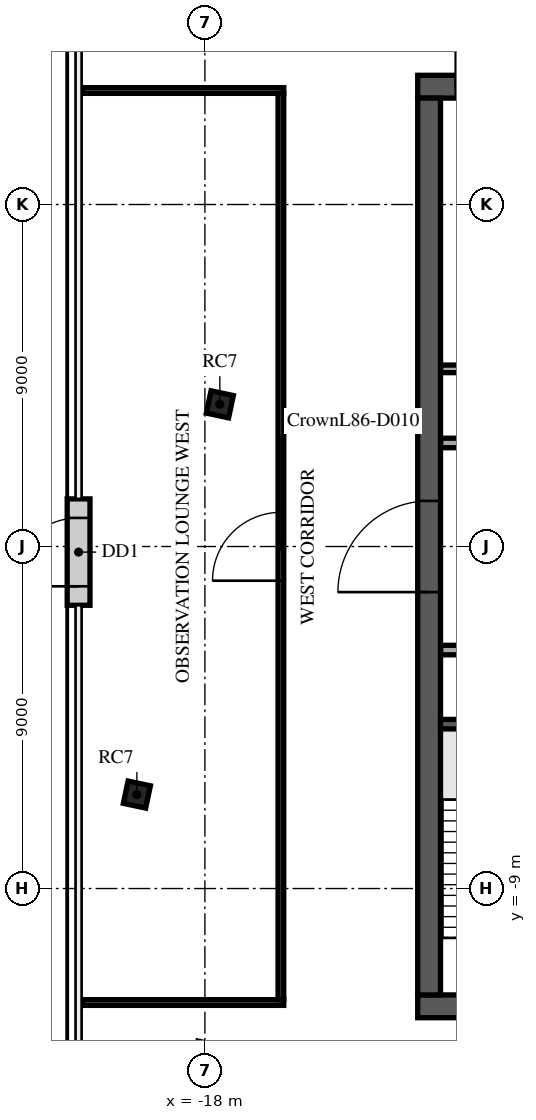
"""IFC4 building model, lengths in metres.
Left out: names, types, materials, properties, quantities, classifications, styles, units other than length and angle.
Written with IfcOpenShell. Run it as: python <this file> out.ifc"""

import sys

from ifc_helpers import new_model, si_unit, direction, frame, frame_2d, origin, origin_2d, place, context, subcontext, project, spatial, rectangle, extrude, element, fill, save


model = new_model("IFC4")
c1 = context("Model", 3, precision=1e-05, world=origin(), true_north=direction((0.0, 1.0)))
c2 = subcontext(c1, "Body", "Model", "MODEL_VIEW")
j1 = project(units=[si_unit("LENGTHUNIT", "METRE"), si_unit("PLANEANGLEUNIT", "RADIAN")], contexts=[c1])
p1 = place(None, origin())
s1 = spatial("IfcSite", under=j1, at=p1, CompositionType="ELEMENT")
p2 = place(p1, origin())
s2 = spatial("IfcBuilding", under=s1, at=p2, CompositionType="ELEMENT")
p3 = place(p2, frame((0.0, 0.0, 368.1)))
s3 = spatial("IfcBuildingStorey", under=s2, at=p3, CompositionType="ELEMENT", Elevation=368.1)
for number, where, z_axis, x_axis in (
    (1, (-17.607, 3.742, 0.0), (0.0, 0.0, 1.0), (0.208, 0.978, 0.0)),
    (2, (-19.79, -6.528, 0.0), (0.0, 0.0, 1.0), (0.208, 0.978, 0.0)),
):
    element("IfcColumn", number, at=place(p3, frame(where, z_axis=z_axis, x_axis=x_axis)), inside=s3, PredefinedType="COLUMN", context=c2, shape_type="SweptSolid", body=[
        extrude(rectangle(XDim=0.6, YDim=0.6, at=origin_2d()), origin(), (0.0, 0.0, 1.0), 5.0),
    ])
p4 = place(p3, frame((-12.4, 12.1, 0.0), z_axis=(0.0, 0.0, 1.0), x_axis=(1.0, 0.0, 0.0)))
e3 = element("IfcWall", 3, at=p4, inside=s3, PredefinedType="SHEAR", context=c2, shape_type="SweptSolid", body=[
    extrude(rectangle(XDim=24.8, YDim=0.6, at=frame_2d((12.4, 0.0))), origin(), (0.0, 0.0, 1.0), 4.7),
])
p5 = place(p4, frame((11.2, 0.0, 0.0)))
e4 = element("IfcOpeningElement", 4, at=p5, cuts=e3, PredefinedType="OPENING", context=c2, shape_type="SweptSolid", body=[
    extrude(rectangle(XDim=2.4, YDim=2.4, at=frame_2d((1.2, 1.2))), frame((0.0, 0.31, 0.0), z_axis=(0.0, -1.0, 0.0), x_axis=(1.0, 0.0, 0.0)), (0.0, 0.0, 1.0), 0.62),
])
p6 = place(p4, frame((22.025, 0.0, 0.0)))
e5 = element("IfcOpeningElement", 5, at=p6, cuts=e3, PredefinedType="OPENING", context=c2, shape_type="SweptSolid", body=[
    extrude(rectangle(XDim=1.2, YDim=2.1, at=frame_2d((0.6, 1.05))), frame((0.0, 0.31, 0.0), z_axis=(0.0, -1.0, 0.0), x_axis=(1.0, 0.0, 0.0)), (0.0, 0.0, 1.0), 0.62),
])
p7 = place(p4, frame((1.0, 0.0, 0.0)))
e6 = element("IfcOpeningElement", 6, at=p7, cuts=e3, PredefinedType="OPENING", context=c2, shape_type="SweptSolid", body=[
    extrude(rectangle(XDim=1.0, YDim=2.1, at=frame_2d((0.5, 1.05))), frame((0.0, 0.31, 0.0), z_axis=(0.0, -1.0, 0.0), x_axis=(1.0, 0.0, 0.0)), (0.0, 0.0, 1.0), 0.62),
])
p8 = place(p3, frame((-12.4, -12.1, 0.0), z_axis=(0.0, 0.0, 1.0), x_axis=(1.0, 0.0, 0.0)))
e7 = element("IfcWall", 7, at=p8, inside=s3, PredefinedType="SHEAR", context=c2, shape_type="SweptSolid", body=[
    extrude(rectangle(XDim=24.8, YDim=0.6, at=frame_2d((12.4, 0.0))), origin(), (0.0, 0.0, 1.0), 4.7),
])
p9 = place(p8, frame((7.3, 0.0, 0.0)))
e8 = element("IfcOpeningElement", 8, at=p9, cuts=e7, PredefinedType="OPENING", context=c2, shape_type="SweptSolid", body=[
    extrude(rectangle(XDim=2.0, YDim=2.1, at=frame_2d((1.0, 1.05))), frame((0.0, 0.31, 0.0), z_axis=(0.0, -1.0, 0.0), x_axis=(1.0, 0.0, 0.0)), (0.0, 0.0, 1.0), 0.62),
])
p10 = place(p8, frame((17.425, 0.0, 0.0)))
e9 = element("IfcOpeningElement", 9, at=p10, cuts=e7, PredefinedType="OPENING", context=c2, shape_type="SweptSolid", body=[
    extrude(rectangle(XDim=1.2, YDim=2.1, at=frame_2d((0.6, 1.05))), frame((0.0, 0.31, 0.0), z_axis=(0.0, -1.0, 0.0), x_axis=(1.0, 0.0, 0.0)), (0.0, 0.0, 1.0), 0.62),
])
p11 = place(p8, frame((1.575, 0.0, 0.0)))
e10 = element("IfcOpeningElement", 10, at=p11, cuts=e7, PredefinedType="OPENING", context=c2, shape_type="SweptSolid", body=[
    extrude(rectangle(XDim=1.2, YDim=2.1, at=frame_2d((0.6, 1.05))), frame((0.0, 0.31, 0.0), z_axis=(0.0, -1.0, 0.0), x_axis=(1.0, 0.0, 0.0)), (0.0, 0.0, 1.0), 0.62),
])
p12 = place(p8, frame((22.025, 0.0, 0.0)))
e11 = element("IfcOpeningElement", 11, at=p12, cuts=e7, PredefinedType="OPENING", context=c2, shape_type="SweptSolid", body=[
    extrude(rectangle(XDim=1.2, YDim=2.1, at=frame_2d((0.6, 1.05))), frame((0.0, 0.31, 0.0), z_axis=(0.0, -1.0, 0.0), x_axis=(1.0, 0.0, 0.0)), (0.0, 0.0, 1.0), 0.62),
])
p13 = place(p3, frame((-12.1, -11.8, 0.0), z_axis=(0.0, 0.0, 1.0), x_axis=(0.0, 1.0, 0.0)))
e12 = element("IfcWall", 12, at=p13, inside=s3, PredefinedType="SHEAR", context=c2, shape_type="SweptSolid", body=[
    extrude(rectangle(XDim=23.6, YDim=0.6, at=frame_2d((11.8, 0.0))), origin(), (0.0, 0.0, 1.0), 4.7),
])
p14 = place(p13, frame((10.6, 0.0, 0.0)))
e13 = element("IfcOpeningElement", 13, at=p14, cuts=e12, PredefinedType="OPENING", context=c2, shape_type="SweptSolid", body=[
    extrude(rectangle(XDim=2.4, YDim=2.4, at=frame_2d((1.2, 1.2))), frame((0.0, 0.31, 0.0), z_axis=(0.0, -1.0, 0.0), x_axis=(1.0, 0.0, 0.0)), (0.0, 0.0, 1.0), 0.62),
])
p15 = place(p3, frame((-8.65, -4.675, 0.0), z_axis=(0.0, 0.0, 1.0), x_axis=(-1.0, 0.0, 0.0)))
e14 = element("IfcWall", 14, at=p15, inside=s3, PredefinedType="SOLIDWALL", context=c2, shape_type="SweptSolid", body=[
    extrude(rectangle(XDim=3.15, YDim=0.25, at=frame_2d((1.575, 0.0))), origin(), (0.0, 0.0, 1.0), 4.7),
])
p16 = place(p3, frame((-11.795, -2.725, 0.0), z_axis=(0.0, 0.0, 1.0), x_axis=(1.0, 0.0, 0.0)))
e15 = element("IfcWall", 15, at=p16, inside=s3, PredefinedType="PARTITIONING", context=c2, shape_type="SweptSolid", body=[
    extrude(rectangle(XDim=14.415, YDim=0.25, at=frame_2d((7.208, 0.0))), origin(), (0.0, 0.0, 1.0), 4.7),
])
p17 = place(p16, frame((1.295, 0.0, 0.0)))
e16 = element("IfcOpeningElement", 16, at=p17, cuts=e15, PredefinedType="OPENING", context=c2, shape_type="SweptSolid", body=[
    extrude(rectangle(XDim=1.0, YDim=2.1, at=frame_2d((0.5, 1.05))), frame((0.0, 0.135, 0.0), z_axis=(0.0, -1.0, 0.0), x_axis=(1.0, 0.0, 0.0)), (0.0, 0.0, 1.0), 0.27),
])
p18 = place(p16, frame((4.42, 0.0, 0.0)))
e17 = element("IfcOpeningElement", 17, at=p18, cuts=e15, PredefinedType="OPENING", context=c2, shape_type="SweptSolid", body=[
    extrude(rectangle(XDim=1.0, YDim=2.1, at=frame_2d((0.5, 1.05))), frame((0.0, 0.135, 0.0), z_axis=(0.0, -1.0, 0.0), x_axis=(1.0, 0.0, 0.0)), (0.0, 0.0, 1.0), 0.27),
])
p19 = place(p16, frame((9.92, 0.0, 0.0)))
e18 = element("IfcOpeningElement", 18, at=p19, cuts=e15, PredefinedType="OPENING", context=c2, shape_type="SweptSolid", body=[
    extrude(rectangle(XDim=1.0, YDim=2.1, at=frame_2d((0.5, 1.05))), frame((0.0, 0.135, 0.0), z_axis=(0.0, -1.0, 0.0), x_axis=(1.0, 0.0, 0.0)), (0.0, 0.0, 1.0), 0.27),
])
p20 = place(p3, frame((-11.795, 2.725, 0.0), z_axis=(0.0, 0.0, 1.0), x_axis=(1.0, 0.0, 0.0)))
e19 = element("IfcWall", 19, at=p20, inside=s3, PredefinedType="PARTITIONING", context=c2, shape_type="SweptSolid", body=[
    extrude(rectangle(XDim=23.59, YDim=0.25, at=frame_2d((11.795, 0.0))), origin(), (0.0, 0.0, 1.0), 4.7),
])
p21 = place(p20, frame((21.345, 0.0, 0.0)))
e20 = element("IfcOpeningElement", 20, at=p21, cuts=e19, PredefinedType="OPENING", context=c2, shape_type="SweptSolid", body=[
    extrude(rectangle(XDim=0.9, YDim=2.1, at=frame_2d((0.45, 1.05))), frame((0.0, 0.135, 0.0), z_axis=(0.0, -1.0, 0.0), x_axis=(1.0, 0.0, 0.0)), (0.0, 0.0, 1.0), 0.27),
])
p22 = place(p20, frame((1.345, 0.0, 0.0)))
e21 = element("IfcOpeningElement", 21, at=p22, cuts=e19, PredefinedType="OPENING", context=c2, shape_type="SweptSolid", body=[
    extrude(rectangle(XDim=0.9, YDim=2.1, at=frame_2d((0.45, 1.05))), frame((0.0, 0.135, 0.0), z_axis=(0.0, -1.0, 0.0), x_axis=(1.0, 0.0, 0.0)), (0.0, 0.0, 1.0), 0.27),
])
p23 = place(p20, frame((4.32, 0.0, 0.0)))
e22 = element("IfcOpeningElement", 22, at=p23, cuts=e19, PredefinedType="OPENING", context=c2, shape_type="SweptSolid", body=[
    extrude(rectangle(XDim=1.2, YDim=2.1, at=frame_2d((0.6, 1.05))), frame((0.0, 0.135, 0.0), z_axis=(0.0, -1.0, 0.0), x_axis=(1.0, 0.0, 0.0)), (0.0, 0.0, 1.0), 0.27),
])
p24 = place(p20, frame((15.42, 0.0, 0.0)))
e23 = element("IfcOpeningElement", 23, at=p24, cuts=e19, PredefinedType="OPENING", context=c2, shape_type="SweptSolid", body=[
    extrude(rectangle(XDim=1.0, YDim=2.1, at=frame_2d((0.5, 1.05))), frame((0.0, 0.135, 0.0), z_axis=(0.0, -1.0, 0.0), x_axis=(1.0, 0.0, 0.0)), (0.0, 0.0, 1.0), 0.27),
])
p25 = place(p3, frame((-11.795, 4.675, 0.0), z_axis=(0.0, 0.0, 1.0), x_axis=(1.0, 0.0, 0.0)))
e24 = element("IfcWall", 24, at=p25, inside=s3, PredefinedType="PARTITIONING", context=c2, shape_type="SweptSolid", body=[
    extrude(rectangle(XDim=3.645, YDim=0.2, at=frame_2d((1.823, 0.0))), origin(), (0.0, 0.0, 1.0), 4.7),
])
for number, where, z_axis, x_axis in (
    (25, (-21.223, -12.0, 0.0), (0.0, 0.0, 1.0), (1.0, 0.0, 0.0)),
    (26, (-21.223, 12.0, 0.0), (0.0, 0.0, 1.0), (1.0, 0.0, 0.0)),
):
    element("IfcWall", number, at=place(p3, frame(where, z_axis=z_axis, x_axis=x_axis)), inside=s3, PredefinedType="PARTITIONING", context=c2, shape_type="SweptSolid", body=[
        extrude(rectangle(XDim=5.298, YDim=0.15, at=frame_2d((2.649, 0.0))), origin(), (0.0, 0.0, 1.0), 4.7),
    ])
p26 = place(p3, frame((-16.0, -11.925, 0.0), z_axis=(0.0, 0.0, 1.0), x_axis=(0.0, 1.0, 0.0)))
e27 = element("IfcWall", 27, at=p26, inside=s3, PredefinedType="PARTITIONING", context=c2, shape_type="SweptSolid", body=[
    extrude(rectangle(XDim=23.85, YDim=0.15, at=frame_2d((11.925, 0.0))), origin(), (0.0, 0.0, 1.0), 4.32),
])
p27 = place(p26, frame((11.025, 0.0, 0.0)))
e28 = element("IfcOpeningElement", 28, at=p27, cuts=e27, PredefinedType="OPENING", context=c2, shape_type="SweptSolid", body=[
    extrude(rectangle(XDim=1.8, YDim=2.1, at=frame_2d((0.9, 1.05))), frame((0.0, 0.085, 0.0), z_axis=(0.0, -1.0, 0.0), x_axis=(1.0, 0.0, 0.0)), (0.0, 0.0, 1.0), 0.17),
])
p28 = place(p3, frame((-21.323, -1.547, 0.0), z_axis=(0.0, 0.0, 1.0), x_axis=(0.0, 1.0, 0.0)))
e29 = element("IfcWall", 29, at=p28, inside=s3, PredefinedType="STANDARD", context=c2, shape_type="SweptSolid", body=[
    extrude(rectangle(XDim=2.8, YDim=0.6, at=frame_2d((1.4, 0.0))), origin(), (0.0, 0.0, 1.0), 4.7),
])
p29 = place(p28, frame((0.5, 0.0, 0.0)))
e30 = element("IfcOpeningElement", 30, at=p29, cuts=e29, PredefinedType="OPENING", context=c2, shape_type="SweptSolid", body=[
    extrude(rectangle(XDim=1.8, YDim=2.4, at=frame_2d((0.9, 1.2))), frame((0.0, 0.31, 0.0), z_axis=(0.0, -1.0, 0.0), x_axis=(1.0, 0.0, 0.0)), (0.0, 0.0, 1.0), 0.62),
])
p30 = place(p14, origin())
e31 = element("IfcDoor", 31, at=p30, inside=s3, OperationType="SINGLE_SWING_LEFT", PredefinedType="DOOR", context=c2, shape_type="SweptSolid", body=[
    extrude(rectangle(XDim=2.4, YDim=2.4, at=frame_2d((1.2, 1.2))), frame((0.0, 0.025, 0.0), z_axis=(0.0, -1.0, 0.0), x_axis=(1.0, 0.0, 0.0)), (0.0, 0.0, 1.0), 0.05),
])
fill(e13, e31)
p31 = place(p27, origin())
e32 = element("IfcDoor", 32, at=p31, inside=s3, OperationType="DOUBLE_DOOR_SINGLE_SWING", PredefinedType="DOOR", context=c2, shape_type="SweptSolid", body=[
    extrude(rectangle(XDim=1.8, YDim=2.1, at=frame_2d((0.9, 1.05))), frame((0.0, 0.025, 0.0), z_axis=(0.0, -1.0, 0.0), x_axis=(1.0, 0.0, 0.0)), (0.0, 0.0, 1.0), 0.05),
])
fill(e28, e32)
p32 = place(p29, origin())
e33 = element("IfcDoor", 33, at=p32, inside=s3, OperationType="DOUBLE_DOOR_SINGLE_SWING", PredefinedType="DOOR", context=c2, shape_type="SweptSolid", body=[
    extrude(rectangle(XDim=1.8, YDim=2.4, at=frame_2d((0.9, 1.2))), frame((0.0, 0.025, 0.0), z_axis=(0.0, -1.0, 0.0), x_axis=(1.0, 0.0, 0.0)), (0.0, 0.0, 1.0), 0.05),
])
fill(e30, e33)
save(model, sys.argv[1])
